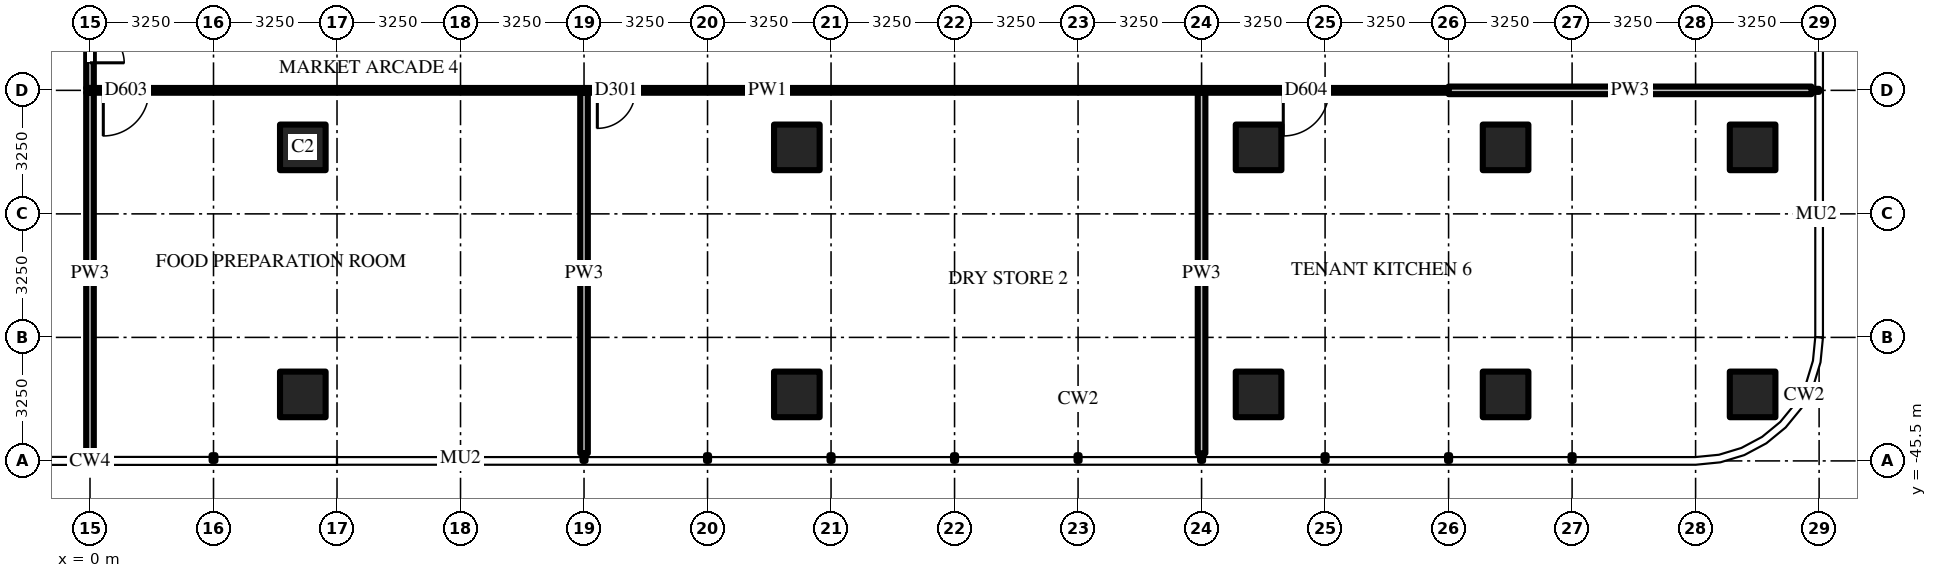
"""IFC4 building model, lengths in metres.
Left out: names, types, materials, properties, quantities, classifications, styles, units other than length and angle.
Written with IfcOpenShell. Run it as: python <this file> out.ifc"""

import sys

from ifc_helpers import new_model, si_unit, direction, frame, frame_2d, origin, origin_2d, place, context, subcontext, project, spatial, rectangle, extrude, source, transform, mapped, element, fill, save


model = new_model("IFC4")
c1 = context("Model", 3, precision=1e-05, world=origin(), true_north=direction((0.0, 1.0)))
c2 = subcontext(c1, "Body", "Model", "MODEL_VIEW")
j1 = project(units=[si_unit("LENGTHUNIT", "METRE"), si_unit("PLANEANGLEUNIT", "RADIAN")], contexts=[c1])
p1 = place(None, origin())
s1 = spatial("IfcSite", under=j1, at=p1, CompositionType="ELEMENT")
p2 = place(p1, origin())
s2 = spatial("IfcBuilding", under=s1, at=p2, CompositionType="ELEMENT")
p3 = place(p2, frame((0.0, 0.0, 8.0)))
s3 = spatial("IfcBuildingStorey", under=s2, at=p3, CompositionType="ELEMENT", Elevation=8.0)
m1 = source(origin(), c2, "Body", "SweptSolid", [
    extrude(rectangle(XDim=1.2, YDim=1.2, at=origin_2d()), origin(), (0.0, 0.0, 1.0), 6.0),
])
for number, where, z_axis, x_axis in (
    (1, (5.6, -37.25, 0.0), (0.0, 0.0, 1.0), (1.0, 0.0, 0.0)),
    (2, (5.6, -43.75, 0.0), (0.0, 0.0, 1.0), (1.0, 0.0, 0.0)),
    (3, (18.6, -37.25, 0.0), (0.0, 0.0, 1.0), (1.0, 0.0, 0.0)),
    (4, (18.6, -43.75, 0.0), (0.0, 0.0, 1.0), (1.0, 0.0, 0.0)),
    (5, (30.75, -37.25, 0.0), (0.0, 0.0, 1.0), (1.0, 0.0, 0.0)),
    (6, (30.75, -43.75, 0.0), (0.0, 0.0, 1.0), (1.0, 0.0, 0.0)),
    (7, (37.25, -37.25, 0.0), (0.0, 0.0, 1.0), (1.0, 0.0, 0.0)),
    (8, (37.25, -43.75, 0.0), (0.0, 0.0, 1.0), (1.0, 0.0, 0.0)),
    (9, (43.75, -37.25, 0.0), (0.0, 0.0, 1.0), (1.0, 0.0, 0.0)),
    (10, (43.75, -43.75, 0.0), (0.0, 0.0, 1.0), (1.0, 0.0, 0.0)),
):
    element("IfcColumn", number, at=place(p3, frame(where, z_axis=z_axis, x_axis=x_axis)), inside=s3, PredefinedType="COLUMN", context=c2, shape_type="MappedRepresentation", body=[
        mapped(m1, transform((0.0, 0.0, 0.0))),
    ])
m2 = source(origin(), c2, "Body", "SweptSolid", [
    extrude(rectangle(XDim=3.188, YDim=0.2, at=frame_2d((1.594, 0.0))), origin(), (0.0, 0.0, 1.0), 4.997),
])
p4 = place(p3, frame((0.0, -32.5, 0.0), z_axis=(0.0, 0.0, 1.0), x_axis=(0.0, -1.0, 0.0)))
e11 = element("IfcWall", 11, at=p4, inside=s3, PredefinedType="PARTITIONING", context=c2, shape_type="MappedRepresentation", body=[
    mapped(m2, transform((0.0, 0.0, 0.0))),
])
m3 = source(origin(), c2, "Body", "SweptSolid", [
    extrude(rectangle(XDim=1.8, YDim=2.1, at=frame_2d((0.9, 1.05))), frame((0.0, 0.11, 0.0), z_axis=(0.0, -1.0, 0.0), x_axis=(1.0, 0.0, 0.0)), (0.0, 0.0, 1.0), 0.22),
])
p5 = place(p4, frame((0.725, 0.0, 0.0)))
e12 = element("IfcOpeningElement", 12, at=p5, cuts=e11, PredefinedType="OPENING", context=c2, shape_type="MappedRepresentation", body=[
    mapped(m3, transform((0.0, 0.0, 0.0))),
])
m4 = source(origin(), c2, "Body", "SweptSolid", [
    extrude(rectangle(XDim=9.488, YDim=0.2, at=frame_2d((4.744, 0.0))), origin(), (0.0, 0.0, 1.0), 4.918),
])
p6 = place(p3, frame((0.0, -35.812, 0.0), z_axis=(0.0, 0.0, 1.0), x_axis=(0.0, -1.0, 0.0)))
e13 = element("IfcWall", 13, at=p6, inside=s3, PredefinedType="PARTITIONING", context=c2, shape_type="MappedRepresentation", body=[
    mapped(m4, transform((0.0, 0.0, 0.0))),
])
p7 = place(p3, frame((13.0, -45.3, 0.0), z_axis=(0.0, 0.0, 1.0), x_axis=(0.0, 1.0, 0.0)))
e14 = element("IfcWall", 14, at=p7, inside=s3, PredefinedType="PARTITIONING", context=c2, shape_type="SweptSolid", body=[
    extrude(rectangle(XDim=9.488, YDim=0.2, at=frame_2d((4.744, 0.0))), origin(), (0.0, 0.0, 1.0), 4.762),
])
m5 = source(origin(), c2, "Body", "SweptSolid", [
    extrude(rectangle(XDim=9.488, YDim=0.2, at=frame_2d((4.744, 0.0))), origin(), (0.0, 0.0, 1.0), 4.839),
])
p8 = place(p3, frame((29.25, -45.3, 0.0), z_axis=(0.0, 0.0, 1.0), x_axis=(0.0, 1.0, 0.0)))
e15 = element("IfcWall", 15, at=p8, inside=s3, PredefinedType="PARTITIONING", context=c2, shape_type="MappedRepresentation", body=[
    mapped(m5, transform((0.0, 0.0, 0.0))),
])
m6 = source(origin(), c2, "Body", "SweptSolid", [
    extrude(rectangle(XDim=9.55, YDim=0.2, at=frame_2d((4.775, 0.0))), origin(), (0.0, 0.0, 1.0), 4.997),
])
p9 = place(p3, frame((35.75, -35.75, 0.0), z_axis=(0.0, 0.0, 1.0), x_axis=(1.0, 0.0, 0.0)))
e16 = element("IfcWall", 16, at=p9, inside=s3, PredefinedType="PARTITIONING", context=c2, shape_type="MappedRepresentation", body=[
    mapped(m6, transform((0.0, 0.0, 0.0))),
])
p10 = place(p3, frame((35.75, -35.75, 0.0), z_axis=(0.0, 0.0, 1.0), x_axis=(-1.0, 0.0, 0.0)))
e17 = element("IfcWall", 17, at=p10, inside=s3, PredefinedType="PARTITIONING", context=c2, shape_type="SweptSolid", body=[
    extrude(rectangle(XDim=35.85, YDim=0.125, at=frame_2d((17.925, 0.0))), origin(), (0.0, 0.0, 1.0), 4.997),
])
m7 = source(origin(), c2, "Body", "SweptSolid", [
    extrude(rectangle(XDim=1.2, YDim=2.1, at=frame_2d((0.6, 1.05))), frame((0.0, 0.073, 0.0), z_axis=(0.0, -1.0, 0.0), x_axis=(1.0, 0.0, 0.0)), (0.0, 0.0, 1.0), 0.145),
])
p11 = place(p10, frame((34.2, 0.0, 0.0)))
e18 = element("IfcOpeningElement", 18, at=p11, cuts=e17, PredefinedType="OPENING", context=c2, shape_type="MappedRepresentation", body=[
    mapped(m7, transform((0.0, 0.0, 0.0))),
])
m8 = source(origin(), c2, "Body", "SweptSolid", [
    extrude(rectangle(XDim=1.0, YDim=2.1, at=frame_2d((0.5, 1.05))), frame((0.0, 0.073, 0.0), z_axis=(0.0, -1.0, 0.0), x_axis=(1.0, 0.0, 0.0)), (0.0, 0.0, 1.0), 0.145),
])
p12 = place(p10, frame((21.4, 0.0, 0.0)))
e19 = element("IfcOpeningElement", 19, at=p12, cuts=e17, PredefinedType="OPENING", context=c2, shape_type="MappedRepresentation", body=[
    mapped(m8, transform((0.0, 0.0, 0.0))),
])
p13 = place(p10, frame((3.15, 0.0, 0.0)))
e20 = element("IfcOpeningElement", 20, at=p13, cuts=e17, PredefinedType="OPENING", context=c2, shape_type="MappedRepresentation", body=[
    mapped(m7, transform((0.0, 0.0, 0.0))),
])
m9 = source(origin(), c2, "Body", "SweptSolid", [
    extrude(rectangle(XDim=1.2, YDim=2.1, at=frame_2d((0.6, 1.05))), frame((0.0, 0.025, 0.0), z_axis=(0.0, -1.0, 0.0), x_axis=(1.0, 0.0, 0.0)), (0.0, 0.0, 1.0), 0.05),
])
p14 = place(p11, origin())
e21 = element("IfcDoor", 21, at=p14, inside=s3, OperationType="SINGLE_SWING_RIGHT", PredefinedType="DOOR", context=c2, shape_type="MappedRepresentation", body=[
    mapped(m9, transform((0.0, 0.0, 0.0))),
])
fill(e18, e21)
m10 = source(origin(), c2, "Body", "SweptSolid", [
    extrude(rectangle(XDim=1.0, YDim=2.1, at=frame_2d((0.5, 1.05))), frame((0.0, 0.025, 0.0), z_axis=(0.0, -1.0, 0.0), x_axis=(1.0, 0.0, 0.0)), (0.0, 0.0, 1.0), 0.05),
])
p15 = place(p12, origin())
e22 = element("IfcDoor", 22, at=p15, inside=s3, OperationType="SINGLE_SWING_RIGHT", PredefinedType="DOOR", context=c2, shape_type="MappedRepresentation", body=[
    mapped(m10, transform((0.0, 0.0, 0.0))),
])
fill(e19, e22)
p16 = place(p13, origin())
e23 = element("IfcDoor", 23, at=p16, inside=s3, OperationType="SINGLE_SWING_RIGHT", PredefinedType="DOOR", context=c2, shape_type="MappedRepresentation", body=[
    mapped(m9, transform((0.0, 0.0, 0.0))),
])
fill(e20, e23)
m11 = source(origin(), c2, "Body", "SweptSolid", [
    extrude(rectangle(XDim=1.8, YDim=2.1, at=frame_2d((0.9, 1.05))), frame((0.0, 0.025, 0.0), z_axis=(0.0, -1.0, 0.0), x_axis=(1.0, 0.0, 0.0)), (0.0, 0.0, 1.0), 0.05),
])
p17 = place(p5, origin())
e24 = element("IfcDoor", 24, at=p17, inside=s3, OperationType="DOUBLE_DOOR_SINGLE_SWING", PredefinedType="DOOR", context=c2, shape_type="MappedRepresentation", body=[
    mapped(m11, transform((0.0, 0.0, 0.0))),
])
fill(e12, e24)
save(model, sys.argv[1])
